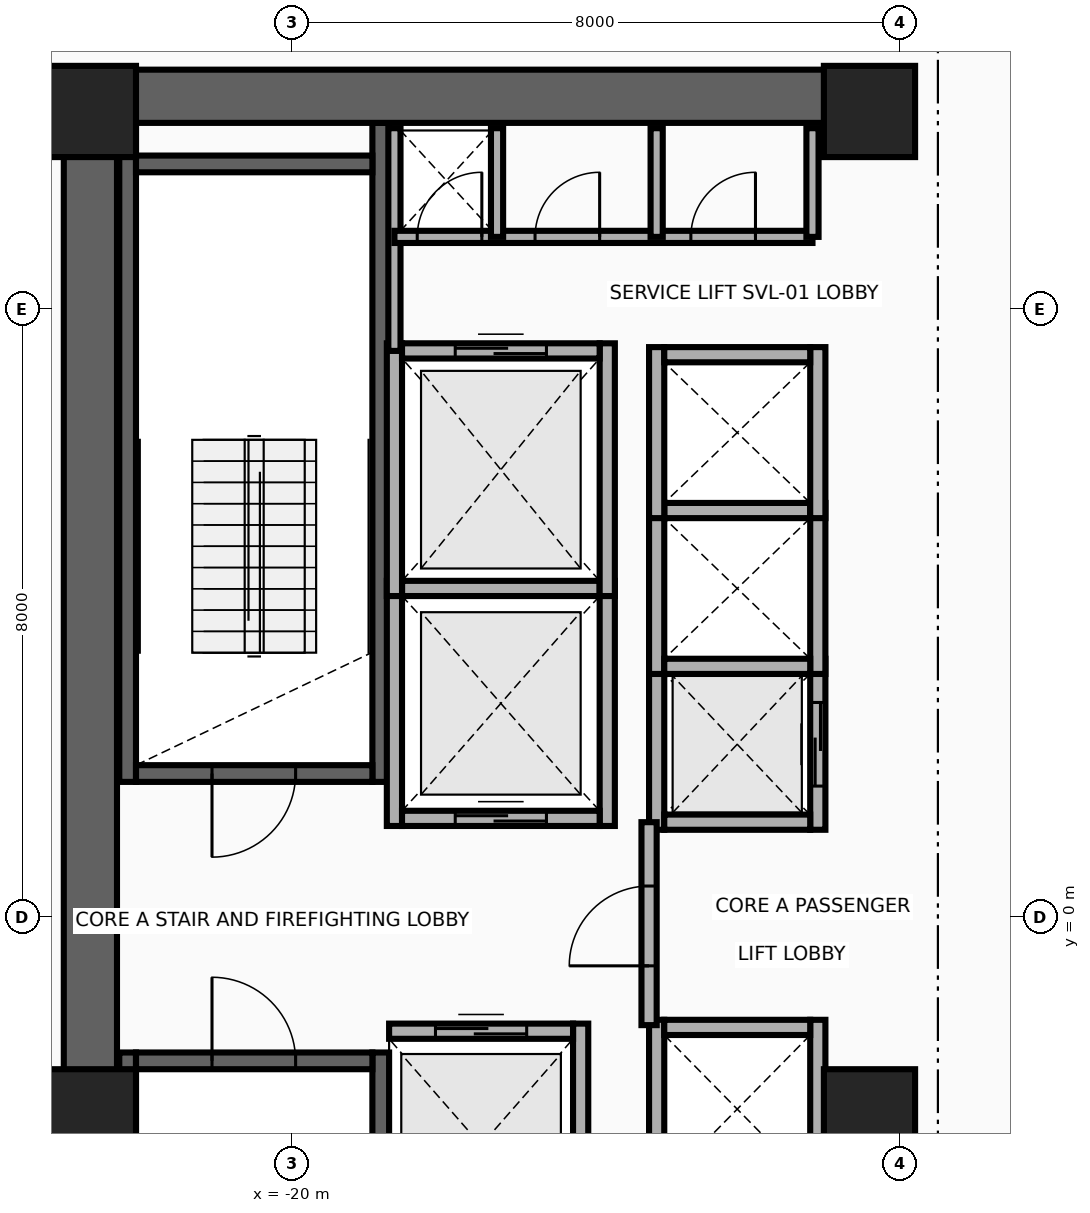
"""IFC4 building model, lengths in metres.
Left out: names, types, materials, properties, quantities, classifications, styles, units other than length and angle.
Written with IfcOpenShell. Run it as: python <this file> out.ifc"""

import sys

from ifc_helpers import new_model, si_unit, direction, frame, frame_2d, origin, origin_2d, place, context, subcontext, project, spatial, rectangle, extrude, source, transform, mapped, element, fill, save


model = new_model("IFC4")
c1 = context("Model", 3, precision=1e-05, world=origin(), true_north=direction((0.0, 1.0)))
c2 = subcontext(c1, "Body", "Model", "MODEL_VIEW")
j1 = project(units=[si_unit("LENGTHUNIT", "METRE"), si_unit("PLANEANGLEUNIT", "RADIAN")], contexts=[c1])
p1 = place(None, origin())
s1 = spatial("IfcSite", under=j1, at=p1, CompositionType="ELEMENT")
p2 = place(p1, origin())
s2 = spatial("IfcBuilding", under=s1, at=p2, CompositionType="ELEMENT")
p3 = place(p2, frame((0.0, 0.0, 146.4)))
s3 = spatial("IfcBuildingStorey", under=s2, at=p3, CompositionType="ELEMENT", Elevation=146.4)
for number, where, z_axis, x_axis in (
    (1, (-22.16, 1.78, 0.0), (0.0, 0.0, 1.0), (0.0, 1.0, 0.0)),
    (2, (-18.83, 1.78, 0.0), (0.0, 0.0, 1.0), (0.0, 1.0, 0.0)),
):
    element("IfcWall", number, at=place(p3, frame(where, z_axis=z_axis, x_axis=x_axis)), inside=s3, PredefinedType="SHEAR", context=c2, shape_type="SweptSolid", body=[
        extrude(rectangle(XDim=8.67, YDim=0.22, at=frame_2d((4.335, 0.0))), origin(), (0.0, 0.0, 1.0), 3.46),
    ])
p4 = place(p3, frame((-22.05, 1.89, 0.0), z_axis=(0.0, 0.0, 1.0), x_axis=(1.0, 0.0, 0.0)))
e3 = element("IfcWall", 3, at=p4, inside=s3, PredefinedType="SHEAR", context=c2, shape_type="SweptSolid", body=[
    extrude(rectangle(XDim=3.11, YDim=0.22, at=frame_2d((1.555, 0.0))), origin(), (0.0, 0.0, 1.0), 3.46),
])
p5 = place(p4, frame((1.0, 0.0, 0.0)))
e4 = element("IfcOpeningElement", 4, at=p5, cuts=e3, PredefinedType="OPENING", context=c2, shape_type="SweptSolid", body=[
    extrude(rectangle(XDim=1.1, YDim=2.15, at=frame_2d((0.55, 1.075))), frame((0.0, 0.125, 0.0), z_axis=(0.0, -1.0, 0.0), x_axis=(1.0, 0.0, 0.0)), (0.0, 0.0, 1.0), 0.25),
])
p6 = place(p3, frame((-22.05, 9.91, 0.0), z_axis=(0.0, 0.0, 1.0), x_axis=(1.0, 0.0, 0.0)))
e5 = element("IfcWall", 5, at=p6, inside=s3, PredefinedType="SHEAR", context=c2, shape_type="SweptSolid", body=[
    extrude(rectangle(XDim=3.11, YDim=0.22, at=frame_2d((1.555, 0.0))), origin(), (0.0, 0.0, 1.0), 3.46),
])
for number, where, z_axis, x_axis in (
    (6, (-22.16, -10.45, 0.0), (0.0, 0.0, 1.0), (0.0, 1.0, 0.0)),
    (7, (-18.83, -10.45, 0.0), (0.0, 0.0, 1.0), (0.0, 1.0, 0.0)),
):
    element("IfcWall", number, at=place(p3, frame(where, z_axis=z_axis, x_axis=x_axis)), inside=s3, PredefinedType="SHEAR", context=c2, shape_type="SweptSolid", body=[
        extrude(rectangle(XDim=8.67, YDim=0.22, at=frame_2d((4.335, 0.0))), origin(), (0.0, 0.0, 1.0), 3.46),
    ])
p7 = place(p3, frame((-22.05, -1.89, 0.0), z_axis=(0.0, 0.0, 1.0), x_axis=(1.0, 0.0, 0.0)))
e8 = element("IfcWall", 8, at=p7, inside=s3, PredefinedType="SHEAR", context=c2, shape_type="SweptSolid", body=[
    extrude(rectangle(XDim=3.11, YDim=0.22, at=frame_2d((1.555, 0.0))), origin(), (0.0, 0.0, 1.0), 3.46),
])
p8 = place(p7, frame((1.0, 0.0, 0.0)))
e9 = element("IfcOpeningElement", 9, at=p8, cuts=e8, PredefinedType="OPENING", context=c2, shape_type="SweptSolid", body=[
    extrude(rectangle(XDim=1.1, YDim=2.15, at=frame_2d((0.55, 1.075))), frame((0.0, 0.125, 0.0), z_axis=(0.0, -1.0, 0.0), x_axis=(1.0, 0.0, 0.0)), (0.0, 0.0, 1.0), 0.25),
])
p9 = place(p3, frame((-22.65, -11.15, 0.0), z_axis=(0.0, 0.0, 1.0), x_axis=(0.0, 1.0, 0.0)))
e10 = element("IfcWall", 10, at=p9, inside=s3, PredefinedType="SHEAR", context=c2, shape_type="SweptSolid", body=[
    extrude(rectangle(XDim=22.3, YDim=0.7, at=frame_2d((11.15, 0.0))), origin(), (0.0, 0.0, 1.0), 3.46),
])
p10 = place(p3, frame((-22.65, 10.8, 0.0), z_axis=(0.0, 0.0, 1.0), x_axis=(1.0, 0.0, 0.0)))
e11 = element("IfcWall", 11, at=p10, inside=s3, PredefinedType="SHEAR", context=c2, shape_type="SweptSolid", body=[
    extrude(rectangle(XDim=10.25, YDim=0.7, at=frame_2d((5.125, 0.0))), origin(), (0.0, 0.0, 1.0), 3.46),
])
m1 = source(origin(), c2, "Body", "SweptSolid", [
    extrude(rectangle(XDim=1.2, YDim=1.2, at=origin_2d()), origin(), (0.0, 0.0, 1.0), 3.7),
])
for number, where, z_axis, x_axis in (
    (12, (-22.65, -2.6, 0.0), (0.0, 0.0, 1.0), (1.0, 0.0, 0.0)),
    (13, (-12.4, -2.6, 0.0), (0.0, 0.0, 1.0), (1.0, 0.0, 0.0)),
    (14, (-22.65, 10.6, 0.0), (0.0, 0.0, 1.0), (1.0, 0.0, 0.0)),
    (15, (-12.4, 10.6, 0.0), (0.0, 0.0, 1.0), (1.0, 0.0, 0.0)),
):
    element("IfcColumn", number, at=place(p3, frame(where, z_axis=z_axis, x_axis=x_axis)), inside=s3, PredefinedType="COLUMN", context=c2, shape_type="MappedRepresentation", body=[
        mapped(m1, transform((0.0, 0.0, 0.0), x_axis=(1.0, 0.0, 0.0), y_axis=(0.0, 1.0, 0.0), z_axis=(0.0, 0.0, 1.0), scale=1.0)),
    ])
for number, where, z_axis, x_axis in (
    (16, (-18.65, 1.2, 0.0), (0.0, 0.0, 1.0), (0.0, 1.0, 0.0)),
    (17, (-15.85, 1.2, 0.0), (0.0, 0.0, 1.0), (0.0, 1.0, 0.0)),
):
    element("IfcWall", number, at=place(p3, frame(where, z_axis=z_axis, x_axis=x_axis)), inside=s3, PredefinedType="MOVABLE", context=c2, shape_type="SweptSolid", body=[
        extrude(rectangle(XDim=3.225, YDim=0.2, at=frame_2d((1.613, 0.0))), origin(), (0.0, 0.0, 1.0), 3.46),
    ])
p11 = place(p3, frame((-18.55, 1.3, 0.0), z_axis=(0.0, 0.0, 1.0), x_axis=(1.0, 0.0, 0.0)))
e18 = element("IfcWall", 18, at=p11, inside=s3, PredefinedType="MOVABLE", context=c2, shape_type="SweptSolid", body=[
    extrude(rectangle(XDim=2.6, YDim=0.2, at=frame_2d((1.3, 0.0))), origin(), (0.0, 0.0, 1.0), 3.46),
])
p12 = place(p11, frame((0.7, 0.0, 0.0)))
e19 = element("IfcOpeningElement", 19, at=p12, cuts=e18, PredefinedType="OPENING", context=c2, shape_type="SweptSolid", body=[
    extrude(rectangle(XDim=1.2, YDim=2.1, at=frame_2d((0.6, 1.05))), frame((0.0, 0.115, 0.0), z_axis=(0.0, -1.0, 0.0), x_axis=(1.0, 0.0, 0.0)), (0.0, 0.0, 1.0), 0.23),
])
p13 = place(p3, frame((-18.55, 4.325, 0.0), z_axis=(0.0, 0.0, 1.0), x_axis=(1.0, 0.0, 0.0)))
e20 = element("IfcWall", 20, at=p13, inside=s3, PredefinedType="MOVABLE", context=c2, shape_type="SweptSolid", body=[
    extrude(rectangle(XDim=2.6, YDim=0.2, at=frame_2d((1.3, 0.0))), origin(), (0.0, 0.0, 1.0), 3.46),
])
p14 = place(p3, frame((-16.2, -4.6, 0.0), z_axis=(0.0, 0.0, 1.0), x_axis=(0.0, 1.0, 0.0)))
e21 = element("IfcWall", 21, at=p14, inside=s3, PredefinedType="MOVABLE", context=c2, shape_type="SweptSolid", body=[
    extrude(rectangle(XDim=3.2, YDim=0.2, at=frame_2d((1.6, 0.0))), origin(), (0.0, 0.0, 1.0), 3.46),
])
p15 = place(p3, frame((-18.72, -1.5, 0.0), z_axis=(0.0, 0.0, 1.0), x_axis=(1.0, 0.0, 0.0)))
e22 = element("IfcWall", 22, at=p15, inside=s3, PredefinedType="MOVABLE", context=c2, shape_type="SweptSolid", body=[
    extrude(rectangle(XDim=2.42, YDim=0.2, at=frame_2d((1.21, 0.0))), origin(), (0.0, 0.0, 1.0), 3.46),
])
p16 = place(p15, frame((0.61, 0.0, 0.0)))
e23 = element("IfcOpeningElement", 23, at=p16, cuts=e22, PredefinedType="OPENING", context=c2, shape_type="SweptSolid", body=[
    extrude(rectangle(XDim=1.2, YDim=2.1, at=frame_2d((0.6, 1.05))), frame((0.0, 0.115, 0.0), z_axis=(0.0, -1.0, 0.0), x_axis=(1.0, 0.0, 0.0)), (0.0, 0.0, 1.0), 0.23),
])
for number, where, z_axis, x_axis in (
    (24, (-18.65, 4.225, 0.0), (0.0, 0.0, 1.0), (0.0, 1.0, 0.0)),
    (25, (-15.85, 4.225, 0.0), (0.0, 0.0, 1.0), (0.0, 1.0, 0.0)),
):
    element("IfcWall", number, at=place(p3, frame(where, z_axis=z_axis, x_axis=x_axis)), inside=s3, PredefinedType="MOVABLE", context=c2, shape_type="SweptSolid", body=[
        extrude(rectangle(XDim=3.325, YDim=0.2, at=frame_2d((1.663, 0.0))), origin(), (0.0, 0.0, 1.0), 3.46),
    ])
p17 = place(p3, frame((-18.55, 7.45, 0.0), z_axis=(0.0, 0.0, 1.0), x_axis=(1.0, 0.0, 0.0)))
e26 = element("IfcWall", 26, at=p17, inside=s3, PredefinedType="MOVABLE", context=c2, shape_type="SweptSolid", body=[
    extrude(rectangle(XDim=2.6, YDim=0.2, at=frame_2d((1.3, 0.0))), origin(), (0.0, 0.0, 1.0), 3.46),
])
p18 = place(p17, frame((0.7, 0.0, 0.0)))
e27 = element("IfcOpeningElement", 27, at=p18, cuts=e26, PredefinedType="OPENING", context=c2, shape_type="SweptSolid", body=[
    extrude(rectangle(XDim=1.2, YDim=2.1, at=frame_2d((0.6, 1.05))), frame((0.0, 0.115, 0.0), z_axis=(0.0, -1.0, 0.0), x_axis=(1.0, 0.0, 0.0)), (0.0, 0.0, 1.0), 0.23),
])
p19 = place(p3, frame((-15.2, 1.15, 0.0), z_axis=(0.0, 0.0, 1.0), x_axis=(0.0, 1.0, 0.0)))
e28 = element("IfcWall", 28, at=p19, inside=s3, PredefinedType="MOVABLE", context=c2, shape_type="SweptSolid", body=[
    extrude(rectangle(XDim=2.25, YDim=0.2, at=frame_2d((1.125, 0.0))), origin(), (0.0, 0.0, 1.0), 3.46),
])
p20 = place(p3, frame((-13.08, 1.15, 0.0), z_axis=(0.0, 0.0, 1.0), x_axis=(0.0, 1.0, 0.0)))
e29 = element("IfcWall", 29, at=p20, inside=s3, PredefinedType="MOVABLE", context=c2, shape_type="SweptSolid", body=[
    extrude(rectangle(XDim=2.25, YDim=0.2, at=frame_2d((1.125, 0.0))), origin(), (0.0, 0.0, 1.0), 3.46),
])
p21 = place(p20, frame((0.575, 0.0, 0.0)))
e30 = element("IfcOpeningElement", 30, at=p21, cuts=e29, PredefinedType="OPENING", context=c2, shape_type="SweptSolid", body=[
    extrude(rectangle(XDim=1.1, YDim=2.1, at=frame_2d((0.55, 1.05))), frame((0.0, 0.115, 0.0), z_axis=(0.0, -1.0, 0.0), x_axis=(1.0, 0.0, 0.0)), (0.0, 0.0, 1.0), 0.23),
])
p22 = place(p3, frame((-15.1, 1.25, 0.0), z_axis=(0.0, 0.0, 1.0), x_axis=(1.0, 0.0, 0.0)))
e31 = element("IfcWall", 31, at=p22, inside=s3, PredefinedType="MOVABLE", context=c2, shape_type="SweptSolid", body=[
    extrude(rectangle(XDim=1.92, YDim=0.2, at=frame_2d((0.96, 0.0))), origin(), (0.0, 0.0, 1.0), 3.46),
])
for number, where, z_axis, x_axis in (
    (32, (-15.2, 3.2, 0.0), (0.0, 0.0, 1.0), (0.0, 1.0, 0.0)),
    (33, (-13.08, 3.2, 0.0), (0.0, 0.0, 1.0), (0.0, 1.0, 0.0)),
):
    element("IfcWall", number, at=place(p3, frame(where, z_axis=z_axis, x_axis=x_axis)), inside=s3, PredefinedType="MOVABLE", context=c2, shape_type="SweptSolid", body=[
        extrude(rectangle(XDim=2.25, YDim=0.2, at=frame_2d((1.125, 0.0))), origin(), (0.0, 0.0, 1.0), 3.46),
    ])
for number, where, z_axis, x_axis in (
    (34, (-15.1, 3.3, 0.0), (0.0, 0.0, 1.0), (1.0, 0.0, 0.0)),
    (35, (-15.1, 5.35, 0.0), (0.0, 0.0, 1.0), (1.0, 0.0, 0.0)),
):
    element("IfcWall", number, at=place(p3, frame(where, z_axis=z_axis, x_axis=x_axis)), inside=s3, PredefinedType="MOVABLE", context=c2, shape_type="SweptSolid", body=[
        extrude(rectangle(XDim=1.92, YDim=0.2, at=frame_2d((0.96, 0.0))), origin(), (0.0, 0.0, 1.0), 3.46),
    ])
for number, where, z_axis, x_axis in (
    (36, (-15.2, 5.25, 0.0), (0.0, 0.0, 1.0), (0.0, 1.0, 0.0)),
    (37, (-13.08, 5.25, 0.0), (0.0, 0.0, 1.0), (0.0, 1.0, 0.0)),
):
    element("IfcWall", number, at=place(p3, frame(where, z_axis=z_axis, x_axis=x_axis)), inside=s3, PredefinedType="MOVABLE", context=c2, shape_type="SweptSolid", body=[
        extrude(rectangle(XDim=2.25, YDim=0.2, at=frame_2d((1.125, 0.0))), origin(), (0.0, 0.0, 1.0), 3.46),
    ])
p23 = place(p3, frame((-15.1, 7.4, 0.0), z_axis=(0.0, 0.0, 1.0), x_axis=(1.0, 0.0, 0.0)))
e38 = element("IfcWall", 38, at=p23, inside=s3, PredefinedType="MOVABLE", context=c2, shape_type="SweptSolid", body=[
    extrude(rectangle(XDim=1.92, YDim=0.2, at=frame_2d((0.96, 0.0))), origin(), (0.0, 0.0, 1.0), 3.46),
])
for number, where, z_axis, x_axis in (
    (39, (-15.2, -3.7, 0.0), (0.0, 0.0, 1.0), (0.0, 1.0, 0.0)),
    (40, (-13.08, -3.7, 0.0), (0.0, 0.0, 1.0), (0.0, 1.0, 0.0)),
):
    element("IfcWall", number, at=place(p3, frame(where, z_axis=z_axis, x_axis=x_axis)), inside=s3, PredefinedType="MOVABLE", context=c2, shape_type="SweptSolid", body=[
        extrude(rectangle(XDim=2.35, YDim=0.2, at=frame_2d((1.175, 0.0))), origin(), (0.0, 0.0, 1.0), 3.46),
    ])
p24 = place(p3, frame((-15.1, -1.45, 0.0), z_axis=(0.0, 0.0, 1.0), x_axis=(1.0, 0.0, 0.0)))
e41 = element("IfcWall", 41, at=p24, inside=s3, PredefinedType="MOVABLE", context=c2, shape_type="SweptSolid", body=[
    extrude(rectangle(XDim=1.92, YDim=0.2, at=frame_2d((0.96, 0.0))), origin(), (0.0, 0.0, 1.0), 3.46),
])
p25 = place(p3, frame((-15.3, -1.42, 0.0), z_axis=(0.0, 0.0, 1.0), x_axis=(0.0, 1.0, 0.0)))
e42 = element("IfcWall", 42, at=p25, inside=s3, PredefinedType="PARTITIONING", context=c2, shape_type="SweptSolid", body=[
    extrude(rectangle(XDim=2.67, YDim=0.2, at=frame_2d((1.335, 0.0))), origin(), (0.0, 0.0, 1.0), 3.46),
])
p26 = place(p25, frame((0.78, 0.0, 0.0)))
e43 = element("IfcOpeningElement", 43, at=p26, cuts=e42, PredefinedType="OPENING", context=c2, shape_type="SweptSolid", body=[
    extrude(rectangle(XDim=1.05, YDim=2.15, at=frame_2d((0.525, 1.075))), frame((0.0, 0.115, 0.0), z_axis=(0.0, -1.0, 0.0), x_axis=(1.0, 0.0, 0.0)), (0.0, 0.0, 1.0), 0.23),
])
p27 = place(p3, frame((-18.65, 7.45, 0.0), z_axis=(0.0, 0.0, 1.0), x_axis=(0.0, 1.0, 0.0)))
e44 = element("IfcWall", 44, at=p27, inside=s3, PredefinedType="PARTITIONING", context=c2, shape_type="SweptSolid", body=[
    extrude(rectangle(XDim=2.93, YDim=0.16, at=frame_2d((1.465, 0.0))), origin(), (0.0, 0.0, 1.0), 3.46),
])
p28 = place(p3, frame((-18.65, 8.95, 0.0), z_axis=(0.0, 0.0, 1.0), x_axis=(1.0, 0.0, 0.0)))
e45 = element("IfcWall", 45, at=p28, inside=s3, PredefinedType="PARTITIONING", context=c2, shape_type="SweptSolid", body=[
    extrude(rectangle(XDim=5.5, YDim=0.16, at=frame_2d((2.75, 0.0))), origin(), (0.0, 0.0, 1.0), 3.46),
])
p29 = place(p28, frame((0.3, 0.0, 0.0)))
e46 = element("IfcOpeningElement", 46, at=p29, cuts=e45, PredefinedType="OPENING", context=c2, shape_type="SweptSolid", body=[
    extrude(rectangle(XDim=0.85, YDim=2.05, at=frame_2d((0.425, 1.025))), frame((0.0, 0.095, 0.0), z_axis=(0.0, -1.0, 0.0), x_axis=(1.0, 0.0, 0.0)), (0.0, 0.0, 1.0), 0.19),
])
p30 = place(p28, frame((1.85, 0.0, 0.0)))
e47 = element("IfcOpeningElement", 47, at=p30, cuts=e45, PredefinedType="OPENING", context=c2, shape_type="SweptSolid", body=[
    extrude(rectangle(XDim=0.85, YDim=2.05, at=frame_2d((0.425, 1.025))), frame((0.0, 0.095, 0.0), z_axis=(0.0, -1.0, 0.0), x_axis=(1.0, 0.0, 0.0)), (0.0, 0.0, 1.0), 0.19),
])
p31 = place(p28, frame((3.9, 0.0, 0.0)))
e48 = element("IfcOpeningElement", 48, at=p31, cuts=e45, PredefinedType="OPENING", context=c2, shape_type="SweptSolid", body=[
    extrude(rectangle(XDim=0.85, YDim=2.05, at=frame_2d((0.425, 1.025))), frame((0.0, 0.095, 0.0), z_axis=(0.0, -1.0, 0.0), x_axis=(1.0, 0.0, 0.0)), (0.0, 0.0, 1.0), 0.19),
])
for number, where, z_axis, x_axis in (
    (49, (-13.15, 8.95, 0.0), (0.0, 0.0, 1.0), (0.0, 1.0, 0.0)),
    (50, (-17.3, 8.95, 0.0), (0.0, 0.0, 1.0), (0.0, 1.0, 0.0)),
    (51, (-15.2, 8.95, 0.0), (0.0, 0.0, 1.0), (0.0, 1.0, 0.0)),
):
    element("IfcWall", number, at=place(p3, frame(where, z_axis=z_axis, x_axis=x_axis)), inside=s3, PredefinedType="PARTITIONING", context=c2, shape_type="SweptSolid", body=[
        extrude(rectangle(XDim=1.43, YDim=0.16, at=frame_2d((0.715, 0.0))), origin(), (0.0, 0.0, 1.0), 3.46),
    ])
p32 = place(p12, origin())
e52 = element("IfcDoor", 52, at=p32, inside=s3, OperationType="DOUBLE_DOOR_SLIDING", PredefinedType="DOOR", context=c2, shape_type="SweptSolid", body=[
    extrude(rectangle(XDim=1.2, YDim=2.1, at=frame_2d((0.6, 1.05))), frame((0.0, 0.025, 0.0), z_axis=(0.0, -1.0, 0.0), x_axis=(1.0, 0.0, 0.0)), (0.0, 0.0, 1.0), 0.05),
])
fill(e19, e52)
p33 = place(p16, origin())
e53 = element("IfcDoor", 53, at=p33, inside=s3, OperationType="DOUBLE_DOOR_SLIDING", PredefinedType="DOOR", context=c2, shape_type="SweptSolid", body=[
    extrude(rectangle(XDim=1.2, YDim=2.1, at=frame_2d((0.6, 1.05))), frame((0.0, 0.025, 0.0), z_axis=(0.0, -1.0, 0.0), x_axis=(1.0, 0.0, 0.0)), (0.0, 0.0, 1.0), 0.05),
])
fill(e23, e53)
p34 = place(p18, origin())
e54 = element("IfcDoor", 54, at=p34, inside=s3, OperationType="DOUBLE_DOOR_SLIDING", PredefinedType="DOOR", context=c2, shape_type="SweptSolid", body=[
    extrude(rectangle(XDim=1.2, YDim=2.1, at=frame_2d((0.6, 1.05))), frame((0.0, 0.025, 0.0), z_axis=(0.0, -1.0, 0.0), x_axis=(1.0, 0.0, 0.0)), (0.0, 0.0, 1.0), 0.05),
])
fill(e27, e54)
p35 = place(p21, origin())
e55 = element("IfcDoor", 55, at=p35, inside=s3, OperationType="DOUBLE_DOOR_SLIDING", PredefinedType="DOOR", context=c2, shape_type="SweptSolid", body=[
    extrude(rectangle(XDim=1.1, YDim=2.1, at=frame_2d((0.55, 1.05))), frame((0.0, 0.025, 0.0), z_axis=(0.0, -1.0, 0.0), x_axis=(1.0, 0.0, 0.0)), (0.0, 0.0, 1.0), 0.05),
])
fill(e30, e55)
p36 = place(p26, origin())
e56 = element("IfcDoor", 56, at=p36, inside=s3, OperationType="SINGLE_SWING_RIGHT", PredefinedType="DOOR", context=c2, shape_type="SweptSolid", body=[
    extrude(rectangle(XDim=1.05, YDim=2.15, at=frame_2d((0.525, 1.075))), frame((0.0, 0.025, 0.0), z_axis=(0.0, -1.0, 0.0), x_axis=(1.0, 0.0, 0.0)), (0.0, 0.0, 1.0), 0.05),
])
fill(e43, e56)
p37 = place(p5, frame((1.1, 0.0, 0.0), z_axis=(0.0, 0.0, 1.0), x_axis=(-1.0, 0.0, 0.0)))
e57 = element("IfcDoor", 57, at=p37, inside=s3, OperationType="SINGLE_SWING_LEFT", PredefinedType="DOOR", context=c2, shape_type="SweptSolid", body=[
    extrude(rectangle(XDim=1.1, YDim=2.15, at=frame_2d((0.55, 1.075))), frame((0.0, 0.025, 0.0), z_axis=(0.0, -1.0, 0.0), x_axis=(1.0, 0.0, 0.0)), (0.0, 0.0, 1.0), 0.05),
])
fill(e4, e57)
p38 = place(p8, origin())
e58 = element("IfcDoor", 58, at=p38, inside=s3, OperationType="SINGLE_SWING_RIGHT", PredefinedType="DOOR", context=c2, shape_type="SweptSolid", body=[
    extrude(rectangle(XDim=1.1, YDim=2.15, at=frame_2d((0.55, 1.075))), frame((0.0, 0.025, 0.0), z_axis=(0.0, -1.0, 0.0), x_axis=(1.0, 0.0, 0.0)), (0.0, 0.0, 1.0), 0.05),
])
fill(e9, e58)
p39 = place(p29, origin())
e59 = element("IfcDoor", 59, at=p39, inside=s3, OperationType="SINGLE_SWING_LEFT", PredefinedType="DOOR", context=c2, shape_type="SweptSolid", body=[
    extrude(rectangle(XDim=0.85, YDim=2.05, at=frame_2d((0.425, 1.025))), frame((0.0, 0.025, 0.0), z_axis=(0.0, -1.0, 0.0), x_axis=(1.0, 0.0, 0.0)), (0.0, 0.0, 1.0), 0.05),
])
fill(e46, e59)
p40 = place(p30, origin())
e60 = element("IfcDoor", 60, at=p40, inside=s3, OperationType="SINGLE_SWING_RIGHT", PredefinedType="DOOR", context=c2, shape_type="SweptSolid", body=[
    extrude(rectangle(XDim=0.85, YDim=2.05, at=frame_2d((0.425, 1.025))), frame((0.0, 0.025, 0.0), z_axis=(0.0, -1.0, 0.0), x_axis=(1.0, 0.0, 0.0)), (0.0, 0.0, 1.0), 0.05),
])
fill(e47, e60)
p41 = place(p31, origin())
e61 = element("IfcDoor", 61, at=p41, inside=s3, OperationType="SINGLE_SWING_LEFT", PredefinedType="DOOR", context=c2, shape_type="SweptSolid", body=[
    extrude(rectangle(XDim=0.85, YDim=2.05, at=frame_2d((0.425, 1.025))), frame((0.0, 0.025, 0.0), z_axis=(0.0, -1.0, 0.0), x_axis=(1.0, 0.0, 0.0)), (0.0, 0.0, 1.0), 0.05),
])
fill(e48, e61)
save(model, sys.argv[1])
